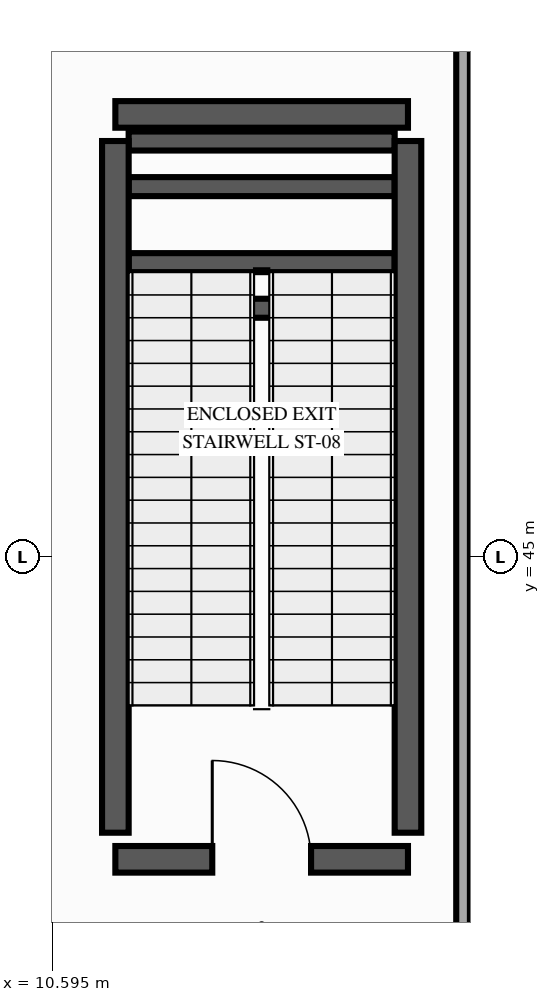
"""IFC4 building model, lengths in metres.
Left out: names, types, materials, properties, quantities, classifications, styles, units other than length and angle.
Written with IfcOpenShell. Run it as: python <this file> out.ifc"""

import sys

from ifc_helpers import new_model, si_unit, direction, frame, frame_2d, origin, place, context, subcontext, project, spatial, rectangle, extrude, element, fill, save


model = new_model("IFC4")
c1 = context("Model", 3, precision=1e-05, world=origin(), true_north=direction((0.0, 1.0)))
c2 = subcontext(c1, "Body", "Model", "MODEL_VIEW")
j1 = project(units=[si_unit("LENGTHUNIT", "METRE"), si_unit("PLANEANGLEUNIT", "RADIAN")], contexts=[c1])
p1 = place(None, origin())
s1 = spatial("IfcSite", under=j1, at=p1, CompositionType="ELEMENT")
p2 = place(p1, origin())
s2 = spatial("IfcBuilding", under=s1, at=p2, CompositionType="ELEMENT")
p3 = place(p2, frame((0.0, 0.0, -6.0)))
s3 = spatial("IfcBuildingStorey", under=s2, at=p3, CompositionType="ELEMENT", Elevation=-6.0)
for number, where, z_axis, x_axis in (
    (1, (11.6, 48.875, 0.0), (0.0, 0.0, 1.0), (1.0, 0.0, 0.0)),
    (2, (11.6, 50.475, 0.0), (0.0, 0.0, 1.0), (1.0, 0.0, 0.0)),
):
    element("IfcWall", number, at=place(p3, frame(where, z_axis=z_axis, x_axis=x_axis)), inside=s3, PredefinedType="SHEAR", context=c2, shape_type="SweptSolid", body=[
        extrude(rectangle(XDim=3.5, YDim=0.25, at=frame_2d((1.75, 0.0))), origin(), (0.0, 0.0, 1.0), 2.8),
    ])
for number, where, z_axis, x_axis in (
    (3, (11.6, 48.275, 0.0), (0.0, 0.0, 1.0), (1.0, 0.0, 0.0)),
    (4, (11.6, 49.875, 0.0), (0.0, 0.0, 1.0), (1.0, 0.0, 0.0)),
):
    element("IfcWall", number, at=place(p3, frame(where, z_axis=z_axis, x_axis=x_axis)), inside=s3, PredefinedType="SHEAR", context=c2, shape_type="SweptSolid", body=[
        extrude(rectangle(XDim=3.5, YDim=0.25, at=frame_2d((1.75, 0.0))), origin(), (0.0, 0.0, 1.0), 5.7),
    ])
p4 = place(p3, frame((11.425, 41.025, 0.0), z_axis=(0.0, 0.0, 1.0), x_axis=(1.0, 0.0, 0.0)))
e5 = element("IfcWall", 5, at=p4, inside=s3, PredefinedType="SHEAR", context=c2, shape_type="SweptSolid", body=[
    extrude(rectangle(XDim=3.85, YDim=0.35, at=frame_2d((1.925, 0.0))), origin(), (0.0, 0.0, 1.0), 5.7),
])
p5 = place(p4, frame((1.275, 0.0, 0.0)))
e6 = element("IfcOpeningElement", 6, at=p5, cuts=e5, PredefinedType="OPENING", context=c2, shape_type="SweptSolid", body=[
    extrude(rectangle(XDim=1.3, YDim=2.2, at=frame_2d((0.65, 1.1))), frame((0.0, 0.185, 0.0), z_axis=(0.0, -1.0, 0.0), x_axis=(1.0, 0.0, 0.0)), (0.0, 0.0, 1.0), 0.37),
])
p6 = place(p3, frame((11.425, 50.825, 0.0), z_axis=(0.0, 0.0, 1.0), x_axis=(1.0, 0.0, 0.0)))
e7 = element("IfcWall", 7, at=p6, inside=s3, PredefinedType="SHEAR", context=c2, shape_type="SweptSolid", body=[
    extrude(rectangle(XDim=3.85, YDim=0.35, at=frame_2d((1.925, 0.0))), origin(), (0.0, 0.0, 1.0), 5.7),
])
for number, where, z_axis, x_axis in (
    (8, (11.425, 41.375, 0.0), (0.0, 0.0, 1.0), (0.0, 1.0, 0.0)),
    (9, (15.275, 41.375, 0.0), (0.0, 0.0, 1.0), (0.0, 1.0, 0.0)),
):
    element("IfcWall", number, at=place(p3, frame(where, z_axis=z_axis, x_axis=x_axis)), inside=s3, PredefinedType="SHEAR", context=c2, shape_type="SweptSolid", body=[
        extrude(rectangle(XDim=9.1, YDim=0.35, at=frame_2d((4.55, 0.0))), origin(), (0.0, 0.0, 1.0), 5.7),
    ])
p7 = place(p3, frame((16.0, 20.1, 0.0), z_axis=(0.0, 0.0, 1.0), x_axis=(0.0, 1.0, 0.0)))
e10 = element("IfcWall", 10, at=p7, inside=s3, PredefinedType="PARTITIONING", context=c2, shape_type="SweptSolid", body=[
    extrude(rectangle(XDim=33.4, YDim=0.18, at=frame_2d((16.7, 0.0))), origin(), (0.0, 0.0, 1.0), 4.785),
])
p8 = place(p7, frame((13.428, 0.0, 0.0)))
e11 = element("IfcOpeningElement", 11, at=p8, cuts=e10, PredefinedType="OPENING", context=c2, shape_type="SweptSolid", body=[
    extrude(rectangle(XDim=1.2, YDim=2.2, at=frame_2d((0.6, 1.1))), frame((0.0, 0.1, 0.0), z_axis=(0.0, -1.0, 0.0), x_axis=(1.0, 0.0, 0.0)), (0.0, 0.0, 1.0), 0.2),
])
p9 = place(p5, origin())
e12 = element("IfcDoor", 12, at=p9, inside=s3, OperationType="SINGLE_SWING_LEFT", PredefinedType="DOOR", context=c2, shape_type="SweptSolid", body=[
    extrude(rectangle(XDim=1.3, YDim=2.2, at=frame_2d((0.65, 1.1))), frame((0.0, 0.025, 0.0), z_axis=(0.0, -1.0, 0.0), x_axis=(1.0, 0.0, 0.0)), (0.0, 0.0, 1.0), 0.05),
])
fill(e6, e12)
save(model, sys.argv[1])
